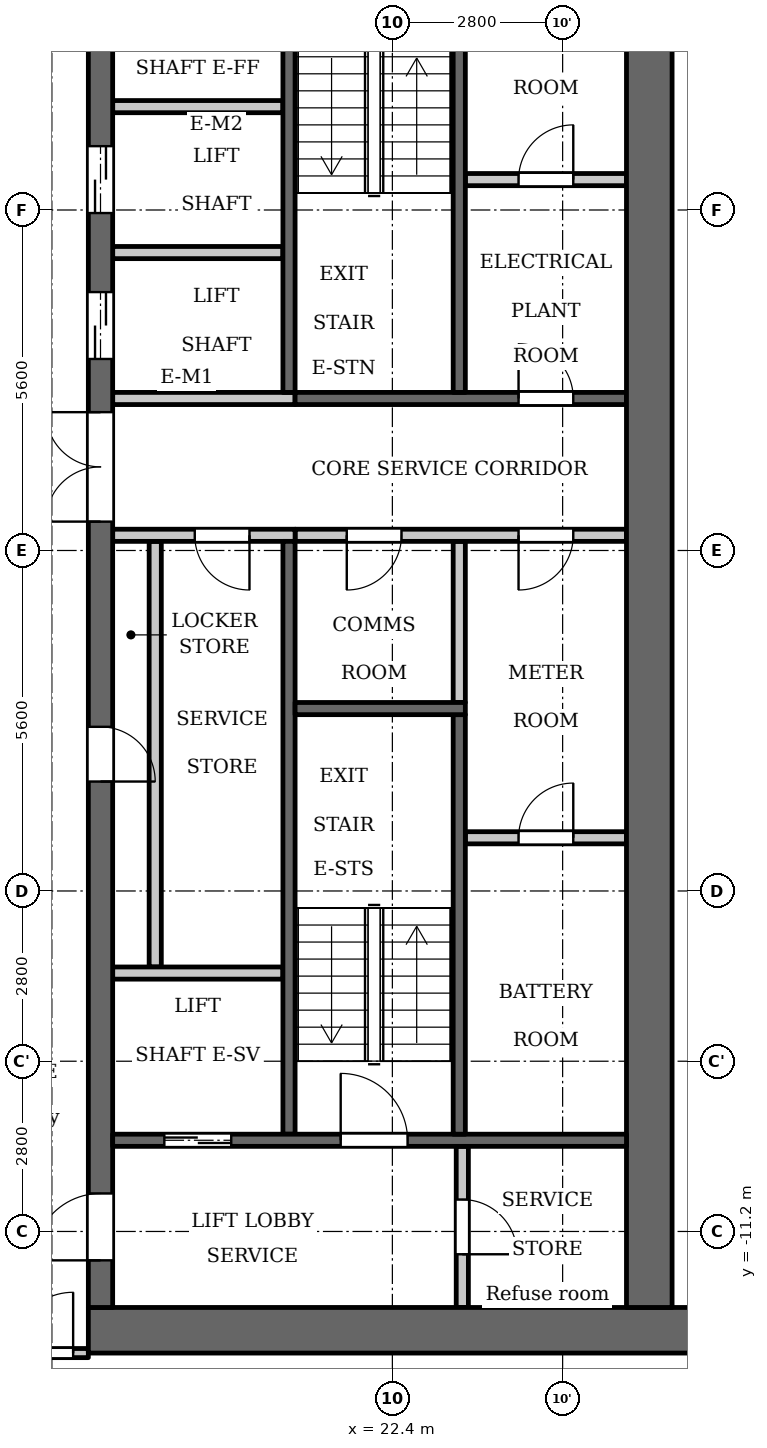
"""IFC4 building model, lengths in metres.
Left out: names, types, materials, properties, quantities, classifications, styles, units other than length and angle.
Written with IfcOpenShell. Run it as: python <this file> out.ifc"""

import sys

from ifc_helpers import new_model, si_unit, direction, frame, frame_2d, origin, place, context, subcontext, project, spatial, rectangle, extrude, element, fill, save


model = new_model("IFC4")
c1 = context("Model", 3, precision=1e-05, world=origin(), true_north=direction((0.0, 1.0)))
c2 = subcontext(c1, "Body", "Model", "MODEL_VIEW")
j1 = project(units=[si_unit("LENGTHUNIT", "METRE"), si_unit("PLANEANGLEUNIT", "RADIAN")], contexts=[c1])
p1 = place(None, origin())
s1 = spatial("IfcSite", under=j1, at=p1, CompositionType="ELEMENT")
p2 = place(p1, origin())
s2 = spatial("IfcBuilding", under=s1, at=p2, CompositionType="ELEMENT")
p3 = place(p2, frame((0.0, 0.0, 164.1)))
s3 = spatial("IfcBuildingStorey", under=s2, at=p3, CompositionType="ELEMENT", Elevation=164.1)
p4 = place(p3, frame((23.5, -2.5, 0.0), z_axis=(0.0, 0.0, 1.0), x_axis=(0.0, 1.0, 0.0)))
e1 = element("IfcWall", 1, at=p4, inside=s3, PredefinedType="PARTITIONING", context=c2, shape_type="SweptSolid", body=[
    extrude(rectangle(XDim=2.65, YDim=0.2, at=frame_2d((1.325, 0.0))), origin(), (0.0, 0.0, 1.0), 3.2),
])
p5 = place(p3, frame((20.7, 2.6, 0.0), z_axis=(0.0, 0.0, 1.0), x_axis=(0.0, 1.0, 0.0)))
e2 = element("IfcWall", 2, at=p5, inside=s3, PredefinedType="SHEAR", context=c2, shape_type="SweptSolid", body=[
    extrude(rectangle(XDim=7.0, YDim=0.2, at=frame_2d((3.5, 0.0))), origin(), (0.0, 0.0, 1.0), 3.2),
])
p6 = place(p3, frame((20.7, -9.6, 0.0), z_axis=(0.0, 0.0, 1.0), x_axis=(0.0, 1.0, 0.0)))
e3 = element("IfcWall", 3, at=p6, inside=s3, PredefinedType="SHEAR", context=c2, shape_type="SweptSolid", body=[
    extrude(rectangle(XDim=9.75, YDim=0.2, at=frame_2d((4.875, 0.0))), origin(), (0.0, 0.0, 1.0), 3.2),
])
p7 = place(p3, frame((20.8, 2.5, 0.0), z_axis=(0.0, 0.0, 1.0), x_axis=(1.0, 0.0, 0.0)))
e4 = element("IfcWall", 4, at=p7, inside=s3, PredefinedType="SHEAR", context=c2, shape_type="SweptSolid", body=[
    extrude(rectangle(XDim=5.45, YDim=0.2, at=frame_2d((2.725, 0.0))), origin(), (0.0, 0.0, 1.0), 3.2),
])
p8 = place(p7, frame((3.675, 0.0, 0.0)))
e5 = element("IfcOpeningElement", 5, at=p8, cuts=e4, PredefinedType="OPENING", context=c2, shape_type="SweptSolid", body=[
    extrude(rectangle(XDim=0.9, YDim=2.1, at=frame_2d((0.45, 1.05))), frame((0.0, 0.11, 0.0), z_axis=(0.0, -1.0, 0.0), x_axis=(1.0, 0.0, 0.0)), (0.0, 0.0, 1.0), 0.22),
])
p9 = place(p3, frame((20.8, 0.25, 0.0), z_axis=(0.0, 0.0, 1.0), x_axis=(1.0, 0.0, 0.0)))
e6 = element("IfcWall", 6, at=p9, inside=s3, PredefinedType="PARTITIONING", context=c2, shape_type="SweptSolid", body=[
    extrude(rectangle(XDim=5.45, YDim=0.2, at=frame_2d((2.725, 0.0))), origin(), (0.0, 0.0, 1.0), 3.2),
])
p10 = place(p9, frame((0.85, 0.0, 0.0)))
e7 = element("IfcOpeningElement", 7, at=p10, cuts=e6, PredefinedType="OPENING", context=c2, shape_type="SweptSolid", body=[
    extrude(rectangle(XDim=0.9, YDim=2.1, at=frame_2d((0.45, 1.05))), frame((0.0, 0.11, 0.0), z_axis=(0.0, -1.0, 0.0), x_axis=(1.0, 0.0, 0.0)), (0.0, 0.0, 1.0), 0.22),
])
p11 = place(p9, frame((3.675, 0.0, 0.0)))
e8 = element("IfcOpeningElement", 8, at=p11, cuts=e6, PredefinedType="OPENING", context=c2, shape_type="SweptSolid", body=[
    extrude(rectangle(XDim=0.9, YDim=2.1, at=frame_2d((0.45, 1.05))), frame((0.0, 0.11, 0.0), z_axis=(0.0, -1.0, 0.0), x_axis=(1.0, 0.0, 0.0)), (0.0, 0.0, 1.0), 0.22),
])
p12 = place(p3, frame((17.4, -12.825, 0.0), z_axis=(0.0, 0.0, 1.0), x_axis=(1.0, 0.0, 0.0)))
e9 = element("IfcWall", 9, at=p12, inside=s3, PredefinedType="SHEAR", context=c2, shape_type="SweptSolid", body=[
    extrude(rectangle(XDim=10.4, YDim=0.75, at=frame_2d((5.2, 0.0))), origin(), (0.0, 0.0, 1.0), 3.2),
])
p13 = place(p3, frame((18.5, -6.85, 0.0), z_axis=(0.0, 0.0, 1.0), x_axis=(0.0, 1.0, 0.0)))
e10 = element("IfcWall", 10, at=p13, inside=s3, PredefinedType="PARTITIONING", context=c2, shape_type="SweptSolid", body=[
    extrude(rectangle(XDim=7.0, YDim=0.2, at=frame_2d((3.5, 0.0))), origin(), (0.0, 0.0, 1.0), 3.2),
])
p14 = place(p3, frame((17.6, -12.45, 0.0), z_axis=(0.0, 0.0, 1.0), x_axis=(0.0, 1.0, 0.0)))
e11 = element("IfcWall", 11, at=p14, inside=s3, PredefinedType="SHEAR", context=c2, shape_type="SweptSolid", body=[
    extrude(rectangle(XDim=24.9, YDim=0.4, at=frame_2d((12.45, 0.0))), origin(), (0.0, 0.0, 1.0), 3.2),
])
p15 = place(p14, frame((8.65, 0.0, 0.0)))
e12 = element("IfcOpeningElement", 12, at=p15, cuts=e11, PredefinedType="OPENING", context=c2, shape_type="SweptSolid", body=[
    extrude(rectangle(XDim=0.9, YDim=2.1, at=frame_2d((0.45, 1.05))), frame((0.0, 0.21, 0.0), z_axis=(0.0, -1.0, 0.0), x_axis=(1.0, 0.0, 0.0)), (0.0, 0.0, 1.0), 0.42),
])
p16 = place(p14, frame((15.6, 0.0, 0.0)))
e13 = element("IfcOpeningElement", 13, at=p16, cuts=e11, PredefinedType="OPENING", context=c2, shape_type="SweptSolid", body=[
    extrude(rectangle(XDim=1.1, YDim=2.1, at=frame_2d((0.55, 1.05))), frame((0.0, 0.21, 0.0), z_axis=(0.0, -1.0, 0.0), x_axis=(1.0, 0.0, 0.0)), (0.0, 0.0, 1.0), 0.42),
])
p17 = place(p14, frame((18.0, 0.0, 0.0)))
e14 = element("IfcOpeningElement", 14, at=p17, cuts=e11, PredefinedType="OPENING", context=c2, shape_type="SweptSolid", body=[
    extrude(rectangle(XDim=1.1, YDim=2.1, at=frame_2d((0.55, 1.05))), frame((0.0, 0.21, 0.0), z_axis=(0.0, -1.0, 0.0), x_axis=(1.0, 0.0, 0.0)), (0.0, 0.0, 1.0), 0.42),
])
p18 = place(p14, frame((23.025, 0.0, 0.0)))
e15 = element("IfcOpeningElement", 15, at=p18, cuts=e11, PredefinedType="OPENING", context=c2, shape_type="SweptSolid", body=[
    extrude(rectangle(XDim=1.1, YDim=2.1, at=frame_2d((0.55, 1.05))), frame((0.0, 0.21, 0.0), z_axis=(0.0, -1.0, 0.0), x_axis=(1.0, 0.0, 0.0)), (0.0, 0.0, 1.0), 0.42),
])
p19 = place(p14, frame((0.775, 0.0, 0.0)))
e16 = element("IfcOpeningElement", 16, at=p19, cuts=e11, PredefinedType="OPENING", context=c2, shape_type="SweptSolid", body=[
    extrude(rectangle(XDim=1.1, YDim=2.1, at=frame_2d((0.55, 1.05))), frame((0.0, 0.21, 0.0), z_axis=(0.0, -1.0, 0.0), x_axis=(1.0, 0.0, 0.0)), (0.0, 0.0, 1.0), 0.42),
])
p20 = place(p14, frame((12.925, 0.0, 0.0)))
e17 = element("IfcOpeningElement", 17, at=p20, cuts=e11, PredefinedType="OPENING", context=c2, shape_type="SweptSolid", body=[
    extrude(rectangle(XDim=1.8, YDim=2.1, at=frame_2d((0.9, 1.05))), frame((0.0, 0.21, 0.0), z_axis=(0.0, -1.0, 0.0), x_axis=(1.0, 0.0, 0.0)), (0.0, 0.0, 1.0), 0.42),
])
p21 = place(p3, frame((26.625, -12.45, 0.0), z_axis=(0.0, 0.0, 1.0), x_axis=(0.0, 1.0, 0.0)))
e18 = element("IfcWall", 18, at=p21, inside=s3, PredefinedType="SHEAR", context=c2, shape_type="SweptSolid", body=[
    extrude(rectangle(XDim=24.9, YDim=0.75, at=frame_2d((12.45, 0.0))), origin(), (0.0, 0.0, 1.0), 3.2),
])
p22 = place(p3, frame((23.55, -12.45, 0.0), z_axis=(0.0, 0.0, 1.0), x_axis=(0.0, 1.0, 0.0)))
e19 = element("IfcWall", 19, at=p22, inside=s3, PredefinedType="PARTITIONING", context=c2, shape_type="SweptSolid", body=[
    extrude(rectangle(XDim=2.65, YDim=0.2, at=frame_2d((1.325, 0.0))), origin(), (0.0, 0.0, 1.0), 3.2),
])
p23 = place(p22, frame((0.875, 0.0, 0.0)))
e20 = element("IfcOpeningElement", 20, at=p23, cuts=e19, PredefinedType="OPENING", context=c2, shape_type="SweptSolid", body=[
    extrude(rectangle(XDim=0.9, YDim=2.1, at=frame_2d((0.45, 1.05))), frame((0.0, 0.11, 0.0), z_axis=(0.0, -1.0, 0.0), x_axis=(1.0, 0.0, 0.0)), (0.0, 0.0, 1.0), 0.22),
])
p24 = place(p3, frame((23.6, -4.725, 0.0), z_axis=(0.0, 0.0, 1.0), x_axis=(1.0, 0.0, 0.0)))
e21 = element("IfcWall", 21, at=p24, inside=s3, PredefinedType="PARTITIONING", context=c2, shape_type="SweptSolid", body=[
    extrude(rectangle(XDim=2.65, YDim=0.2, at=frame_2d((1.325, 0.0))), origin(), (0.0, 0.0, 1.0), 3.2),
])
p25 = place(p24, frame((0.875, 0.0, 0.0)))
e22 = element("IfcOpeningElement", 22, at=p25, cuts=e21, PredefinedType="OPENING", context=c2, shape_type="SweptSolid", body=[
    extrude(rectangle(XDim=0.9, YDim=2.1, at=frame_2d((0.45, 1.05))), frame((0.0, 0.11, 0.0), z_axis=(0.0, -1.0, 0.0), x_axis=(1.0, 0.0, 0.0)), (0.0, 0.0, 1.0), 0.22),
])
p26 = place(p3, frame((23.6, 6.1, 0.0), z_axis=(0.0, 0.0, 1.0), x_axis=(1.0, 0.0, 0.0)))
e23 = element("IfcWall", 23, at=p26, inside=s3, PredefinedType="PARTITIONING", context=c2, shape_type="SweptSolid", body=[
    extrude(rectangle(XDim=2.65, YDim=0.2, at=frame_2d((1.325, 0.0))), origin(), (0.0, 0.0, 1.0), 3.2),
])
p27 = place(p26, frame((0.875, 0.0, 0.0)))
e24 = element("IfcOpeningElement", 24, at=p27, cuts=e23, PredefinedType="OPENING", context=c2, shape_type="SweptSolid", body=[
    extrude(rectangle(XDim=0.9, YDim=2.1, at=frame_2d((0.45, 1.05))), frame((0.0, 0.11, 0.0), z_axis=(0.0, -1.0, 0.0), x_axis=(1.0, 0.0, 0.0)), (0.0, 0.0, 1.0), 0.22),
])
p28 = place(p3, frame((17.8, -9.7, 0.0), z_axis=(0.0, 0.0, 1.0), x_axis=(1.0, 0.0, 0.0)))
e25 = element("IfcWall", 25, at=p28, inside=s3, PredefinedType="SHEAR", context=c2, shape_type="SweptSolid", body=[
    extrude(rectangle(XDim=8.45, YDim=0.2, at=frame_2d((4.225, 0.0))), origin(), (0.0, 0.0, 1.0), 3.2),
])
p29 = place(p28, frame((0.85, 0.0, 0.0)))
e26 = element("IfcOpeningElement", 26, at=p29, cuts=e25, PredefinedType="OPENING", context=c2, shape_type="SweptSolid", body=[
    extrude(rectangle(XDim=1.1, YDim=2.1, at=frame_2d((0.55, 1.05))), frame((0.0, 0.11, 0.0), z_axis=(0.0, -1.0, 0.0), x_axis=(1.0, 0.0, 0.0)), (0.0, 0.0, 1.0), 0.22),
])
p30 = place(p28, frame((3.75, 0.0, 0.0)))
e27 = element("IfcOpeningElement", 27, at=p30, cuts=e25, PredefinedType="OPENING", context=c2, shape_type="SweptSolid", body=[
    extrude(rectangle(XDim=1.1, YDim=2.1, at=frame_2d((0.55, 1.05))), frame((0.0, 0.11, 0.0), z_axis=(0.0, -1.0, 0.0), x_axis=(1.0, 0.0, 0.0)), (0.0, 0.0, 1.0), 0.22),
])
p31 = place(p3, frame((17.8, -6.95, 0.0), z_axis=(0.0, 0.0, 1.0), x_axis=(1.0, 0.0, 0.0)))
e28 = element("IfcWall", 28, at=p31, inside=s3, PredefinedType="PARTITIONING", context=c2, shape_type="SweptSolid", body=[
    extrude(rectangle(XDim=2.8, YDim=0.2, at=frame_2d((1.4, 0.0))), origin(), (0.0, 0.0, 1.0), 3.2),
])
p32 = place(p3, frame((17.8, 0.25, 0.0), z_axis=(0.0, 0.0, 1.0), x_axis=(1.0, 0.0, 0.0)))
e29 = element("IfcWall", 29, at=p32, inside=s3, PredefinedType="PARTITIONING", context=c2, shape_type="SweptSolid", body=[
    extrude(rectangle(XDim=3.0, YDim=0.2, at=frame_2d((1.5, 0.0))), origin(), (0.0, 0.0, 1.0), 3.2),
])
p33 = place(p32, frame((1.35, 0.0, 0.0)))
e30 = element("IfcOpeningElement", 30, at=p33, cuts=e29, PredefinedType="OPENING", context=c2, shape_type="SweptSolid", body=[
    extrude(rectangle(XDim=0.9, YDim=2.1, at=frame_2d((0.45, 1.05))), frame((0.0, 0.11, 0.0), z_axis=(0.0, -1.0, 0.0), x_axis=(1.0, 0.0, 0.0)), (0.0, 0.0, 1.0), 0.22),
])
p34 = place(p3, frame((17.8, 2.5, 0.0), z_axis=(0.0, 0.0, 1.0), x_axis=(1.0, 0.0, 0.0)))
e31 = element("IfcWall", 31, at=p34, inside=s3, PredefinedType="PARTITIONING", context=c2, shape_type="SweptSolid", body=[
    extrude(rectangle(XDim=3.0, YDim=0.2, at=frame_2d((1.5, 0.0))), origin(), (0.0, 0.0, 1.0), 3.2),
])
for number, where, z_axis, x_axis in (
    (32, (17.8, 4.9, 0.0), (0.0, 0.0, 1.0), (1.0, 0.0, 0.0)),
    (33, (17.8, 7.3, 0.0), (0.0, 0.0, 1.0), (1.0, 0.0, 0.0)),
):
    element("IfcWall", number, at=place(p3, frame(where, z_axis=z_axis, x_axis=x_axis)), inside=s3, PredefinedType="PARTITIONING", context=c2, shape_type="SweptSolid", body=[
        extrude(rectangle(XDim=2.8, YDim=0.2, at=frame_2d((1.4, 0.0))), origin(), (0.0, 0.0, 1.0), 3.2),
    ])
p35 = place(p3, frame((23.5, 2.6, 0.0), z_axis=(0.0, 0.0, 1.0), x_axis=(0.0, 1.0, 0.0)))
e34 = element("IfcWall", 34, at=p35, inside=s3, PredefinedType="SHEAR", context=c2, shape_type="SweptSolid", body=[
    extrude(rectangle(XDim=7.0, YDim=0.2, at=frame_2d((3.5, 0.0))), origin(), (0.0, 0.0, 1.0), 3.2),
])
p36 = place(p3, frame((23.5, -9.6, 0.0), z_axis=(0.0, 0.0, 1.0), x_axis=(0.0, 1.0, 0.0)))
e35 = element("IfcWall", 35, at=p36, inside=s3, PredefinedType="SHEAR", context=c2, shape_type="SweptSolid", body=[
    extrude(rectangle(XDim=6.9, YDim=0.2, at=frame_2d((3.45, 0.0))), origin(), (0.0, 0.0, 1.0), 3.2),
])
p37 = place(p3, frame((20.8, -2.6, 0.0), z_axis=(0.0, 0.0, 1.0), x_axis=(1.0, 0.0, 0.0)))
e36 = element("IfcWall", 36, at=p37, inside=s3, PredefinedType="SHEAR", context=c2, shape_type="SweptSolid", body=[
    extrude(rectangle(XDim=2.8, YDim=0.2, at=frame_2d((1.4, 0.0))), origin(), (0.0, 0.0, 1.0), 3.2),
])
p38 = place(p3, frame((-17.4, -13.2, 0.0), z_axis=(0.0, 0.0, 1.0), x_axis=(1.0, 0.0, 0.0)))
e37 = element("IfcWall", 37, at=p38, inside=s3, PredefinedType="PARTITIONING", context=c2, shape_type="SweptSolid", body=[
    extrude(rectangle(XDim=34.8, YDim=0.15, at=frame_2d((17.4, 0.0))), origin(), (0.0, 0.0, 1.0), 3.2),
])
p39 = place(p38, frame((0.15, 0.0, 0.0)))
e38 = element("IfcOpeningElement", 38, at=p39, cuts=e37, PredefinedType="OPENING", context=c2, shape_type="SweptSolid", body=[
    extrude(rectangle(XDim=1.0, YDim=2.1, at=frame_2d((0.5, 1.05))), frame((0.0, 0.085, 0.0), z_axis=(0.0, -1.0, 0.0), x_axis=(1.0, 0.0, 0.0)), (0.0, 0.0, 1.0), 0.17),
])
p40 = place(p38, frame((33.55, 0.0, 0.0)))
e39 = element("IfcOpeningElement", 39, at=p40, cuts=e37, PredefinedType="OPENING", context=c2, shape_type="SweptSolid", body=[
    extrude(rectangle(XDim=1.0, YDim=2.1, at=frame_2d((0.5, 1.05))), frame((0.0, 0.085, 0.0), z_axis=(0.0, -1.0, 0.0), x_axis=(1.0, 0.0, 0.0)), (0.0, 0.0, 1.0), 0.17),
])
p41 = place(p38, frame((3.5, 0.0, 0.0)))
e40 = element("IfcOpeningElement", 40, at=p41, cuts=e37, PredefinedType="OPENING", context=c2, shape_type="SweptSolid", body=[
    extrude(rectangle(XDim=1.0, YDim=2.1, at=frame_2d((0.5, 1.05))), frame((0.0, 0.085, 0.0), z_axis=(0.0, -1.0, 0.0), x_axis=(1.0, 0.0, 0.0)), (0.0, 0.0, 1.0), 0.17),
])
p42 = place(p38, frame((10.1, 0.0, 0.0)))
e41 = element("IfcOpeningElement", 41, at=p42, cuts=e37, PredefinedType="OPENING", context=c2, shape_type="SweptSolid", body=[
    extrude(rectangle(XDim=1.0, YDim=2.1, at=frame_2d((0.5, 1.05))), frame((0.0, 0.085, 0.0), z_axis=(0.0, -1.0, 0.0), x_axis=(1.0, 0.0, 0.0)), (0.0, 0.0, 1.0), 0.17),
])
p43 = place(p38, frame((15.7, 0.0, 0.0)))
e42 = element("IfcOpeningElement", 42, at=p43, cuts=e37, PredefinedType="OPENING", context=c2, shape_type="SweptSolid", body=[
    extrude(rectangle(XDim=1.0, YDim=2.1, at=frame_2d((0.5, 1.05))), frame((0.0, 0.085, 0.0), z_axis=(0.0, -1.0, 0.0), x_axis=(1.0, 0.0, 0.0)), (0.0, 0.0, 1.0), 0.17),
])
p44 = place(p38, frame((18.05, 0.0, 0.0)))
e43 = element("IfcOpeningElement", 43, at=p44, cuts=e37, PredefinedType="OPENING", context=c2, shape_type="SweptSolid", body=[
    extrude(rectangle(XDim=1.0, YDim=2.1, at=frame_2d((0.5, 1.05))), frame((0.0, 0.085, 0.0), z_axis=(0.0, -1.0, 0.0), x_axis=(1.0, 0.0, 0.0)), (0.0, 0.0, 1.0), 0.17),
])
p45 = place(p38, frame((26.9, 0.0, 0.0)))
e44 = element("IfcOpeningElement", 44, at=p45, cuts=e37, PredefinedType="OPENING", context=c2, shape_type="SweptSolid", body=[
    extrude(rectangle(XDim=1.0, YDim=2.1, at=frame_2d((0.5, 1.05))), frame((0.0, 0.085, 0.0), z_axis=(0.0, -1.0, 0.0), x_axis=(1.0, 0.0, 0.0)), (0.0, 0.0, 1.0), 0.17),
])
p46 = place(p29, origin())
e45 = element("IfcDoor", 45, at=p46, inside=s3, OperationType="DOUBLE_DOOR_SLIDING", PredefinedType="DOOR", context=c2, shape_type="SweptSolid", body=[
    extrude(rectangle(XDim=1.1, YDim=2.1, at=frame_2d((0.55, 1.05))), frame((0.0, 0.025, 0.0), z_axis=(0.0, -1.0, 0.0), x_axis=(1.0, 0.0, 0.0)), (0.0, 0.0, 1.0), 0.05),
])
fill(e26, e45)
p47 = place(p15, origin())
e46 = element("IfcDoor", 46, at=p47, inside=s3, OperationType="SINGLE_SWING_LEFT", PredefinedType="DOOR", context=c2, shape_type="SweptSolid", body=[
    extrude(rectangle(XDim=0.9, YDim=2.1, at=frame_2d((0.45, 1.05))), frame((0.0, 0.025, 0.0), z_axis=(0.0, -1.0, 0.0), x_axis=(1.0, 0.0, 0.0)), (0.0, 0.0, 1.0), 0.05),
])
fill(e12, e46)
p48 = place(p33, origin())
e47 = element("IfcDoor", 47, at=p48, inside=s3, OperationType="SINGLE_SWING_RIGHT", PredefinedType="DOOR", context=c2, shape_type="SweptSolid", body=[
    extrude(rectangle(XDim=0.9, YDim=2.1, at=frame_2d((0.45, 1.05))), frame((0.0, 0.025, 0.0), z_axis=(0.0, -1.0, 0.0), x_axis=(1.0, 0.0, 0.0)), (0.0, 0.0, 1.0), 0.05),
])
fill(e30, e47)
p49 = place(p16, origin())
e48 = element("IfcDoor", 48, at=p49, inside=s3, OperationType="DOUBLE_DOOR_SLIDING", PredefinedType="DOOR", context=c2, shape_type="SweptSolid", body=[
    extrude(rectangle(XDim=1.1, YDim=2.1, at=frame_2d((0.55, 1.05))), frame((0.0, 0.025, 0.0), z_axis=(0.0, -1.0, 0.0), x_axis=(1.0, 0.0, 0.0)), (0.0, 0.0, 1.0), 0.05),
])
fill(e13, e48)
p50 = place(p17, origin())
e49 = element("IfcDoor", 49, at=p50, inside=s3, OperationType="DOUBLE_DOOR_SLIDING", PredefinedType="DOOR", context=c2, shape_type="SweptSolid", body=[
    extrude(rectangle(XDim=1.1, YDim=2.1, at=frame_2d((0.55, 1.05))), frame((0.0, 0.025, 0.0), z_axis=(0.0, -1.0, 0.0), x_axis=(1.0, 0.0, 0.0)), (0.0, 0.0, 1.0), 0.05),
])
fill(e14, e49)
p51 = place(p19, origin())
e50 = element("IfcDoor", 50, at=p51, inside=s3, OperationType="SINGLE_SWING_RIGHT", PredefinedType="DOOR", context=c2, shape_type="SweptSolid", body=[
    extrude(rectangle(XDim=1.1, YDim=2.1, at=frame_2d((0.55, 1.05))), frame((0.0, 0.025, 0.0), z_axis=(0.0, -1.0, 0.0), x_axis=(1.0, 0.0, 0.0)), (0.0, 0.0, 1.0), 0.05),
])
fill(e16, e50)
p52 = place(p23, origin())
e51 = element("IfcDoor", 51, at=p52, inside=s3, OperationType="SINGLE_SWING_LEFT", PredefinedType="DOOR", context=c2, shape_type="SweptSolid", body=[
    extrude(rectangle(XDim=0.9, YDim=2.1, at=frame_2d((0.45, 1.05))), frame((0.0, 0.025, 0.0), z_axis=(0.0, -1.0, 0.0), x_axis=(1.0, 0.0, 0.0)), (0.0, 0.0, 1.0), 0.05),
])
fill(e20, e51)
p53 = place(p30, origin())
e52 = element("IfcDoor", 52, at=p53, inside=s3, OperationType="SINGLE_SWING_RIGHT", PredefinedType="DOOR", context=c2, shape_type="SweptSolid", body=[
    extrude(rectangle(XDim=1.1, YDim=2.1, at=frame_2d((0.55, 1.05))), frame((0.0, 0.025, 0.0), z_axis=(0.0, -1.0, 0.0), x_axis=(1.0, 0.0, 0.0)), (0.0, 0.0, 1.0), 0.05),
])
fill(e27, e52)
p54 = place(p20, origin())
e53 = element("IfcDoor", 53, at=p54, inside=s3, OperationType="DOUBLE_DOOR_SINGLE_SWING", PredefinedType="DOOR", context=c2, shape_type="SweptSolid", body=[
    extrude(rectangle(XDim=1.8, YDim=2.1, at=frame_2d((0.9, 1.05))), frame((0.0, 0.025, 0.0), z_axis=(0.0, -1.0, 0.0), x_axis=(1.0, 0.0, 0.0)), (0.0, 0.0, 1.0), 0.05),
])
fill(e17, e53)
p55 = place(p10, origin())
e54 = element("IfcDoor", 54, at=p55, inside=s3, OperationType="SINGLE_SWING_LEFT", PredefinedType="DOOR", context=c2, shape_type="SweptSolid", body=[
    extrude(rectangle(XDim=0.9, YDim=2.1, at=frame_2d((0.45, 1.05))), frame((0.0, 0.025, 0.0), z_axis=(0.0, -1.0, 0.0), x_axis=(1.0, 0.0, 0.0)), (0.0, 0.0, 1.0), 0.05),
])
fill(e7, e54)
p56 = place(p25, origin())
e55 = element("IfcDoor", 55, at=p56, inside=s3, OperationType="SINGLE_SWING_LEFT", PredefinedType="DOOR", context=c2, shape_type="SweptSolid", body=[
    extrude(rectangle(XDim=0.9, YDim=2.1, at=frame_2d((0.45, 1.05))), frame((0.0, 0.025, 0.0), z_axis=(0.0, -1.0, 0.0), x_axis=(1.0, 0.0, 0.0)), (0.0, 0.0, 1.0), 0.05),
])
fill(e22, e55)
p57 = place(p11, origin())
e56 = element("IfcDoor", 56, at=p57, inside=s3, OperationType="SINGLE_SWING_LEFT", PredefinedType="DOOR", context=c2, shape_type="SweptSolid", body=[
    extrude(rectangle(XDim=0.9, YDim=2.1, at=frame_2d((0.45, 1.05))), frame((0.0, 0.025, 0.0), z_axis=(0.0, -1.0, 0.0), x_axis=(1.0, 0.0, 0.0)), (0.0, 0.0, 1.0), 0.05),
])
fill(e8, e56)
p58 = place(p27, origin())
e57 = element("IfcDoor", 57, at=p58, inside=s3, OperationType="SINGLE_SWING_LEFT", PredefinedType="DOOR", context=c2, shape_type="SweptSolid", body=[
    extrude(rectangle(XDim=0.9, YDim=2.1, at=frame_2d((0.45, 1.05))), frame((0.0, 0.025, 0.0), z_axis=(0.0, -1.0, 0.0), x_axis=(1.0, 0.0, 0.0)), (0.0, 0.0, 1.0), 0.05),
])
fill(e24, e57)
p59 = place(p8, origin())
e58 = element("IfcDoor", 58, at=p59, inside=s3, OperationType="SINGLE_SWING_RIGHT", PredefinedType="DOOR", context=c2, shape_type="SweptSolid", body=[
    extrude(rectangle(XDim=0.9, YDim=2.1, at=frame_2d((0.45, 1.05))), frame((0.0, 0.025, 0.0), z_axis=(0.0, -1.0, 0.0), x_axis=(1.0, 0.0, 0.0)), (0.0, 0.0, 1.0), 0.05),
])
fill(e5, e58)
p60 = place(p40, origin())
e59 = element("IfcDoor", 59, at=p60, inside=s3, OperationType="SINGLE_SWING_LEFT", PredefinedType="DOOR", context=c2, shape_type="SweptSolid", body=[
    extrude(rectangle(XDim=1.0, YDim=2.1, at=frame_2d((0.5, 1.05))), frame((0.0, 0.025, 0.0), z_axis=(0.0, -1.0, 0.0), x_axis=(1.0, 0.0, 0.0)), (0.0, 0.0, 1.0), 0.05),
])
fill(e39, e59)
save(model, sys.argv[1])
